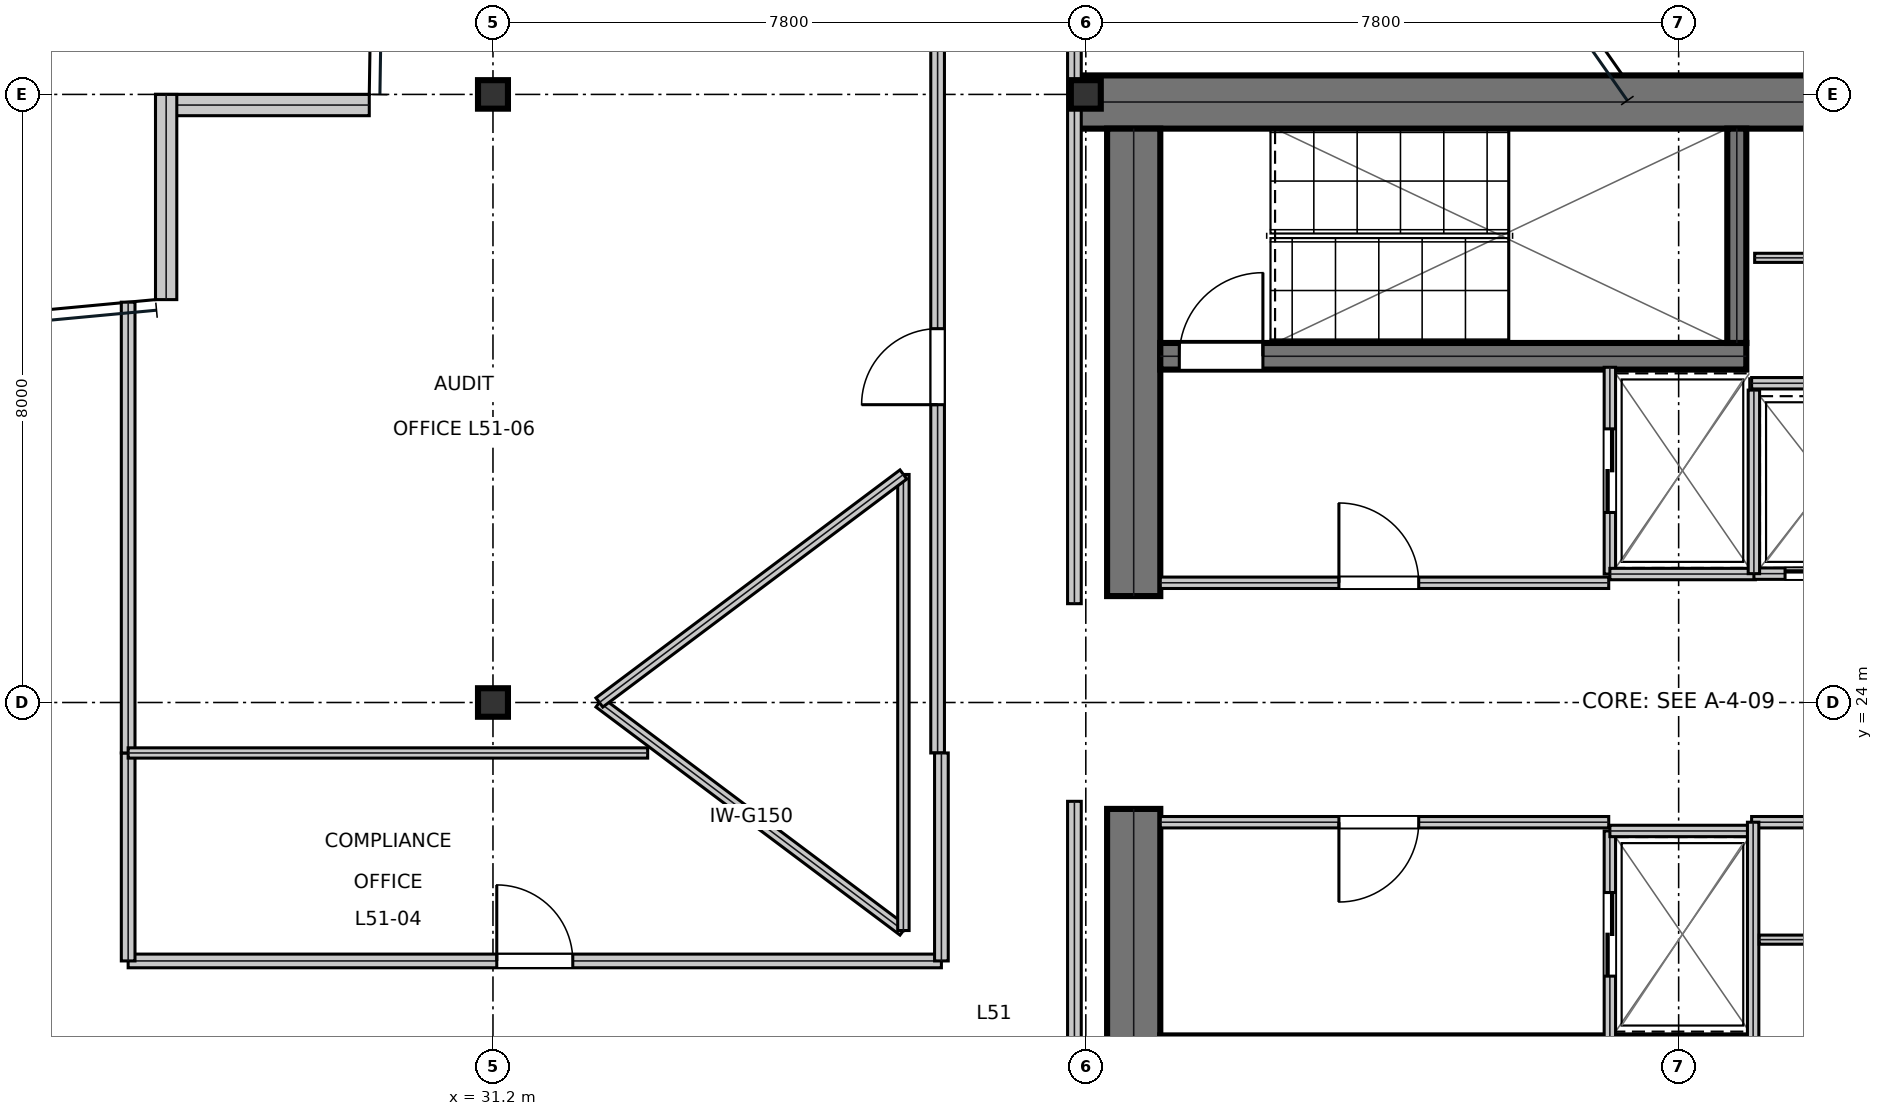
"""IFC4 building model, lengths in metres.
Left out: names, types, materials, properties, quantities, classifications, styles, units other than length and angle.
Written with IfcOpenShell. Run it as: python <this file> out.ifc"""

import sys

from ifc_helpers import new_model, si_unit, direction, frame, frame_2d, origin, origin_2d, place, context, subcontext, project, spatial, rectangle, i_section, extrude, element, fill, save


model = new_model("IFC4")
c1 = context("Model", 3, precision=1e-05, world=origin(), true_north=direction((0.0, 1.0)))
c2 = subcontext(c1, "Body", "Model", "MODEL_VIEW")
j1 = project(units=[si_unit("LENGTHUNIT", "METRE"), si_unit("PLANEANGLEUNIT", "RADIAN")], contexts=[c1])
p1 = place(None, origin())
s1 = spatial("IfcSite", under=j1, at=p1, CompositionType="ELEMENT")
p2 = place(p1, origin())
s2 = spatial("IfcBuilding", under=s1, at=p2, CompositionType="ELEMENT")
p3 = place(p2, frame((0.0, 0.0, 220.2)))
s3 = spatial("IfcBuildingStorey", under=s2, at=p3, CompositionType="ELEMENT", Elevation=220.2)
p4 = place(p3, frame((38.8, 31.9, 0.0), z_axis=(0.0, 0.0, 1.0), x_axis=(1.0, 0.0, 0.0)))
e1 = element("IfcWall", 1, at=p4, inside=s3, PredefinedType="SHEAR", context=c2, shape_type="SweptSolid", body=[
    extrude(rectangle(XDim=16.0, YDim=0.7, at=frame_2d((8.0, 0.0))), origin(), (0.0, 0.0, 1.0), 3.79),
])
for number, where, z_axis, x_axis in (
    (2, (39.63, 16.45, 0.0), (0.0, 0.0, 1.0), (0.0, 1.0, 0.0)),
    (3, (39.63, 25.4, 0.0), (0.0, 0.0, 1.0), (0.0, 1.0, 0.0)),
):
    element("IfcWall", number, at=place(p3, frame(where, z_axis=z_axis, x_axis=x_axis)), inside=s3, PredefinedType="SHEAR", context=c2, shape_type="SweptSolid", body=[
        extrude(rectangle(XDim=6.15, YDim=0.7, at=frame_2d((3.075, 0.0))), origin(), (0.0, 0.0, 1.0), 3.79),
    ])
p5 = place(p3, frame((39.98, 28.555, 0.0), z_axis=(0.0, 0.0, 1.0), x_axis=(1.0, 0.0, 0.0)))
e4 = element("IfcWall", 4, at=p5, inside=s3, PredefinedType="SHEAR", context=c2, shape_type="SweptSolid", body=[
    extrude(rectangle(XDim=7.71, YDim=0.35, at=frame_2d((3.855, 0.0))), origin(), (0.0, 0.0, 1.0), 3.79),
])
p6 = place(p5, frame((0.25, 0.0, 0.0)))
e5 = element("IfcOpeningElement", 5, at=p6, cuts=e4, PredefinedType="OPENING", context=c2, shape_type="SweptSolid", body=[
    extrude(rectangle(XDim=1.1, YDim=2.15, at=frame_2d((0.55, 1.075))), frame((0.0, 0.185, 0.0), z_axis=(0.0, -1.0, 0.0), x_axis=(1.0, 0.0, 0.0)), (0.0, 0.0, 1.0), 0.37),
])
p7 = place(p3, frame((39.98, 19.445, 0.0), z_axis=(0.0, 0.0, 1.0), x_axis=(1.0, 0.0, 0.0)))
e6 = element("IfcWall", 6, at=p7, inside=s3, PredefinedType="SHEAR", context=c2, shape_type="SweptSolid", body=[
    extrude(rectangle(XDim=7.71, YDim=0.35, at=frame_2d((3.855, 0.0))), origin(), (0.0, 0.0, 1.0), 3.79),
])
p8 = place(p7, frame((0.25, 0.0, 0.0)))
e7 = element("IfcOpeningElement", 7, at=p8, cuts=e6, PredefinedType="OPENING", context=c2, shape_type="SweptSolid", body=[
    extrude(rectangle(XDim=1.1, YDim=2.15, at=frame_2d((0.55, 1.075))), frame((0.0, 0.185, 0.0), z_axis=(0.0, -1.0, 0.0), x_axis=(1.0, 0.0, 0.0)), (0.0, 0.0, 1.0), 0.37),
])
p9 = place(p3, frame((47.565, 28.73, 0.0), z_axis=(0.0, 0.0, 1.0), x_axis=(0.0, 1.0, 0.0)))
e8 = element("IfcWall", 8, at=p9, inside=s3, PredefinedType="SHEAR", context=c2, shape_type="SweptSolid", body=[
    extrude(rectangle(XDim=2.82, YDim=0.25, at=frame_2d((1.41, 0.0))), origin(), (0.0, 0.0, 1.0), 3.79),
])
for number, where, z_axis, x_axis in (
    (9, (31.2, 24.0, 0.0), (0.0, 0.0, 1.0), (1.0, 0.0, 0.0)),
    (10, (31.2, 32.0, 0.0), (0.0, 0.0, 1.0), (1.0, 0.0, 0.0)),
    (11, (39.0, 32.0, 0.0), (0.0, 0.0, 1.0), (1.0, 0.0, 0.0)),
):
    element("IfcColumn", number, at=place(p3, frame(where, z_axis=z_axis, x_axis=x_axis)), inside=s3, PredefinedType="COLUMN", context=c2, shape_type="SweptSolid", body=[
        extrude(i_section(OverallWidth=0.394, OverallDepth=0.375, WebThickness=0.017, FlangeThickness=0.028, at=origin_2d()), origin(), (0.0, 0.0, 1.0), 4.044),
    ])
p10 = place(p3, frame((29.573, 31.86, 0.0), z_axis=(0.0, 0.0, 1.0), x_axis=(-1.0, 0.0, 0.0)))
e12 = element("IfcWall", 12, at=p10, inside=s3, PredefinedType="STANDARD", context=c2, shape_type="SweptSolid", body=[
    extrude(rectangle(XDim=2.812, YDim=0.28, at=frame_2d((1.406, 0.0))), origin(), (0.0, 0.0, 1.0), 3.79),
])
p11 = place(p3, frame((26.9, 32.0, 0.0), z_axis=(0.0, 0.0, 1.0), x_axis=(0.0, -1.0, 0.0)))
e13 = element("IfcWall", 13, at=p11, inside=s3, PredefinedType="STANDARD", context=c2, shape_type="SweptSolid", body=[
    extrude(rectangle(XDim=2.7, YDim=0.28, at=frame_2d((1.35, 0.0))), origin(), (0.0, 0.0, 1.0), 3.319),
])
p12 = place(p3, frame((39.98, 25.575, 0.0), z_axis=(0.0, 0.0, 1.0), x_axis=(1.0, 0.0, 0.0)))
e14 = element("IfcWall", 14, at=p12, inside=s3, PredefinedType="PARTITIONING", context=c2, shape_type="SweptSolid", body=[
    extrude(rectangle(XDim=5.9, YDim=0.15, at=frame_2d((2.95, 0.0))), origin(), (0.0, 0.0, 1.0), 3.79),
])
p13 = place(p12, frame((2.35, 0.0, 0.0)))
e15 = element("IfcOpeningElement", 15, at=p13, cuts=e14, PredefinedType="OPENING", context=c2, shape_type="SweptSolid", body=[
    extrude(rectangle(XDim=1.05, YDim=2.15, at=frame_2d((0.525, 1.075))), frame((0.0, 0.085, 0.0), z_axis=(0.0, -1.0, 0.0), x_axis=(1.0, 0.0, 0.0)), (0.0, 0.0, 1.0), 0.17),
])
p14 = place(p3, frame((39.98, 22.425, 0.0), z_axis=(0.0, 0.0, 1.0), x_axis=(1.0, 0.0, 0.0)))
e16 = element("IfcWall", 16, at=p14, inside=s3, PredefinedType="PARTITIONING", context=c2, shape_type="SweptSolid", body=[
    extrude(rectangle(XDim=5.9, YDim=0.15, at=frame_2d((2.95, 0.0))), origin(), (0.0, 0.0, 1.0), 3.79),
])
p15 = place(p14, frame((2.35, 0.0, 0.0)))
e17 = element("IfcOpeningElement", 17, at=p15, cuts=e16, PredefinedType="OPENING", context=c2, shape_type="SweptSolid", body=[
    extrude(rectangle(XDim=1.05, YDim=2.15, at=frame_2d((0.525, 1.075))), frame((0.0, 0.085, 0.0), z_axis=(0.0, -1.0, 0.0), x_axis=(1.0, 0.0, 0.0)), (0.0, 0.0, 1.0), 0.17),
])
p16 = place(p3, frame((45.895, 25.69, 0.0), z_axis=(0.0, 0.0, 1.0), x_axis=(0.0, 1.0, 0.0)))
e18 = element("IfcWall", 18, at=p16, inside=s3, PredefinedType="PARTITIONING", context=c2, shape_type="SweptSolid", body=[
    extrude(rectangle(XDim=2.72, YDim=0.15, at=frame_2d((1.36, 0.0))), origin(), (0.0, 0.0, 1.0), 3.79),
])
p17 = place(p16, frame((0.81, 0.0, 0.0)))
e19 = element("IfcOpeningElement", 19, at=p17, cuts=e18, PredefinedType="OPENING", context=c2, shape_type="SweptSolid", body=[
    extrude(rectangle(XDim=1.1, YDim=2.15, at=frame_2d((0.55, 1.075))), frame((0.0, 0.085, 0.0), z_axis=(0.0, -1.0, 0.0), x_axis=(1.0, 0.0, 0.0)), (0.0, 0.0, 1.0), 0.17),
])
p18 = place(p3, frame((45.895, 25.69, 0.0), z_axis=(0.0, 0.0, 1.0), x_axis=(1.0, 0.0, 0.0)))
e20 = element("IfcWall", 20, at=p18, inside=s3, PredefinedType="PARTITIONING", context=c2, shape_type="SweptSolid", body=[
    extrude(rectangle(XDim=1.915, YDim=0.15, at=frame_2d((0.958, 0.0))), origin(), (0.0, 0.0, 1.0), 3.79),
])
p19 = place(p3, frame((45.895, 19.59, 0.0), z_axis=(0.0, 0.0, 1.0), x_axis=(0.0, 1.0, 0.0)))
e21 = element("IfcWall", 21, at=p19, inside=s3, PredefinedType="PARTITIONING", context=c2, shape_type="SweptSolid", body=[
    extrude(rectangle(XDim=2.72, YDim=0.15, at=frame_2d((1.36, 0.0))), origin(), (0.0, 0.0, 1.0), 3.79),
])
p20 = place(p19, frame((0.81, 0.0, 0.0)))
e22 = element("IfcOpeningElement", 22, at=p20, cuts=e21, PredefinedType="OPENING", context=c2, shape_type="SweptSolid", body=[
    extrude(rectangle(XDim=1.1, YDim=2.15, at=frame_2d((0.55, 1.075))), frame((0.0, 0.085, 0.0), z_axis=(0.0, -1.0, 0.0), x_axis=(1.0, 0.0, 0.0)), (0.0, 0.0, 1.0), 0.17),
])
p21 = place(p3, frame((45.895, 22.31, 0.0), z_axis=(0.0, 0.0, 1.0), x_axis=(1.0, 0.0, 0.0)))
e23 = element("IfcWall", 23, at=p21, inside=s3, PredefinedType="PARTITIONING", context=c2, shape_type="SweptSolid", body=[
    extrude(rectangle(XDim=1.915, YDim=0.15, at=frame_2d((0.958, 0.0))), origin(), (0.0, 0.0, 1.0), 3.79),
])
p22 = place(p3, frame((47.79, 25.695, 0.0), z_axis=(0.0, 0.0, 1.0), x_axis=(1.0, 0.0, 0.0)))
e24 = element("IfcWall", 24, at=p22, inside=s3, PredefinedType="PARTITIONING", context=c2, shape_type="SweptSolid", body=[
    extrude(rectangle(XDim=1.92, YDim=0.15, at=frame_2d((0.96, 0.0))), origin(), (0.0, 0.0, 1.0), 3.79),
])
p23 = place(p22, frame((0.41, 0.0, 0.0)))
e25 = element("IfcOpeningElement", 25, at=p23, cuts=e24, PredefinedType="OPENING", context=c2, shape_type="SweptSolid", body=[
    extrude(rectangle(XDim=1.1, YDim=2.15, at=frame_2d((0.55, 1.075))), frame((0.0, 0.085, 0.0), z_axis=(0.0, -1.0, 0.0), x_axis=(1.0, 0.0, 0.0)), (0.0, 0.0, 1.0), 0.17),
])
p24 = place(p3, frame((47.79, 25.695, 0.0), z_axis=(0.0, 0.0, 1.0), x_axis=(0.0, 1.0, 0.0)))
e26 = element("IfcWall", 26, at=p24, inside=s3, PredefinedType="PARTITIONING", context=c2, shape_type="SweptSolid", body=[
    extrude(rectangle(XDim=2.415, YDim=0.15, at=frame_2d((1.208, 0.0))), origin(), (0.0, 0.0, 1.0), 3.79),
])
p25 = place(p3, frame((47.76, 22.425, 0.0), z_axis=(0.0, 0.0, 1.0), x_axis=(1.0, 0.0, 0.0)))
e27 = element("IfcWall", 27, at=p25, inside=s3, PredefinedType="PARTITIONING", context=c2, shape_type="SweptSolid", body=[
    extrude(rectangle(XDim=1.96, YDim=0.15, at=frame_2d((0.98, 0.0))), origin(), (0.0, 0.0, 1.0), 3.79),
])
p26 = place(p3, frame((47.78, 16.45, 0.0), z_axis=(0.0, 0.0, 1.0), x_axis=(0.0, 1.0, 0.0)))
e28 = element("IfcWall", 28, at=p26, inside=s3, PredefinedType="PARTITIONING", context=c2, shape_type="SweptSolid", body=[
    extrude(rectangle(XDim=5.975, YDim=0.15, at=frame_2d((2.988, 0.0))), origin(), (0.0, 0.0, 1.0), 3.79),
])
p27 = place(p3, frame((47.86, 20.88, 0.0), z_axis=(0.0, 0.0, 1.0), x_axis=(1.0, 0.0, 0.0)))
e29 = element("IfcWall", 29, at=p27, inside=s3, PredefinedType="PARTITIONING", context=c2, shape_type="SweptSolid", body=[
    extrude(rectangle(XDim=1.76, YDim=0.12, at=frame_2d((0.88, 0.0))), origin(), (0.0, 0.0, 1.0), 3.79),
])
p28 = place(p3, frame((47.76, 28.2, 0.0), z_axis=(0.0, 0.0, 1.0), x_axis=(1.0, 0.0, 0.0)))
e30 = element("IfcWall", 30, at=p28, inside=s3, PredefinedType="PARTITIONING", context=c2, shape_type="SweptSolid", body=[
    extrude(rectangle(XDim=2.04, YDim=0.15, at=frame_2d((1.02, 0.0))), origin(), (0.0, 0.0, 1.0), 3.79),
])
p29 = place(p3, frame((47.8, 29.85, 0.0), z_axis=(0.0, 0.0, 1.0), x_axis=(1.0, 0.0, 0.0)))
e31 = element("IfcWall", 31, at=p29, inside=s3, PredefinedType="PARTITIONING", context=c2, shape_type="SweptSolid", body=[
    extrude(rectangle(XDim=5.86, YDim=0.12, at=frame_2d((2.93, 0.0))), origin(), (0.0, 0.0, 1.0), 3.79),
])
p30 = place(p29, frame((2.6, 0.0, 0.0)))
e32 = element("IfcOpeningElement", 32, at=p30, cuts=e31, PredefinedType="OPENING", context=c2, shape_type="SweptSolid", body=[
    extrude(rectangle(XDim=0.85, YDim=2.15, at=frame_2d((0.425, 1.075))), frame((0.0, 0.07, 0.0), z_axis=(0.0, -1.0, 0.0), x_axis=(1.0, 0.0, 0.0)), (0.0, 0.0, 1.0), 0.14),
])
p31 = place(p3, frame((26.4, 20.6, 0.0), z_axis=(0.0, 0.0, 1.0), x_axis=(1.0, 0.0, 0.0)))
e33 = element("IfcWall", 33, at=p31, inside=s3, PredefinedType="SOLIDWALL", context=c2, shape_type="SweptSolid", body=[
    extrude(rectangle(XDim=10.7, YDim=0.18, at=frame_2d((5.35, 0.0))), origin(), (0.0, 0.0, 1.0), 3.241),
])
p32 = place(p31, frame((4.85, 0.0, 0.0)))
e34 = element("IfcOpeningElement", 34, at=p32, cuts=e33, PredefinedType="OPENING", context=c2, shape_type="SweptSolid", body=[
    extrude(rectangle(XDim=1.0, YDim=2.15, at=frame_2d((0.5, 1.075))), frame((0.0, 0.1, 0.0), z_axis=(0.0, -1.0, 0.0), x_axis=(1.0, 0.0, 0.0)), (0.0, 0.0, 1.0), 0.2),
])
p33 = place(p3, frame((37.05, 23.336, 0.0), z_axis=(0.0, 0.0, 1.0), x_axis=(0.0, 1.0, 0.0)))
e35 = element("IfcWall", 35, at=p33, inside=s3, PredefinedType="SOLIDWALL", context=c2, shape_type="SweptSolid", body=[
    extrude(rectangle(XDim=10.164, YDim=0.18, at=frame_2d((5.082, 0.0))), origin(), (0.0, 0.0, 1.0), 3.241),
])
p34 = place(p33, frame((4.582, 0.0, 0.0)))
e36 = element("IfcOpeningElement", 36, at=p34, cuts=e35, PredefinedType="OPENING", context=c2, shape_type="SweptSolid", body=[
    extrude(rectangle(XDim=1.0, YDim=2.15, at=frame_2d((0.5, 1.075))), frame((0.0, 0.1, 0.0), z_axis=(0.0, -1.0, 0.0), x_axis=(1.0, 0.0, 0.0)), (0.0, 0.0, 1.0), 0.2),
])
p35 = place(p3, frame((38.85, 14.707, 0.0), z_axis=(0.0, 0.0, 1.0), x_axis=(0.0, 1.0, 0.0)))
e37 = element("IfcWall", 37, at=p35, inside=s3, PredefinedType="SOLIDWALL", context=c2, shape_type="SweptSolid", body=[
    extrude(rectangle(XDim=7.993, YDim=0.18, at=frame_2d((3.997, 0.0))), origin(), (0.0, 0.0, 1.0), 3.241),
])
p36 = place(p3, frame((26.4, 20.6, 0.0), z_axis=(0.0, 0.0, 1.0), x_axis=(0.0, 1.0, 0.0)))
e38 = element("IfcWall", 38, at=p36, inside=s3, PredefinedType="SOLIDWALL", context=c2, shape_type="SweptSolid", body=[
    extrude(rectangle(XDim=2.736, YDim=0.18, at=frame_2d((1.368, 0.0))), origin(), (0.0, 0.0, 1.0), 3.241),
])
p37 = place(p3, frame((37.1, 20.6, 0.0), z_axis=(0.0, 0.0, 1.0), x_axis=(0.0, 1.0, 0.0)))
e39 = element("IfcWall", 39, at=p37, inside=s3, PredefinedType="SOLIDWALL", context=c2, shape_type="SweptSolid", body=[
    extrude(rectangle(XDim=2.736, YDim=0.18, at=frame_2d((1.368, 0.0))), origin(), (0.0, 0.0, 1.0), 3.79),
])
p38 = place(p3, frame((38.85, 25.3, 0.0), z_axis=(0.0, 0.0, 1.0), x_axis=(0.0, 1.0, 0.0)))
e40 = element("IfcWall", 40, at=p38, inside=s3, PredefinedType="SOLIDWALL", context=c2, shape_type="SweptSolid", body=[
    extrude(rectangle(XDim=8.2, YDim=0.18, at=frame_2d((4.1, 0.0))), origin(), (0.0, 0.0, 1.0), 3.241),
])
p39 = place(p3, frame((26.4, 23.336, 0.0), z_axis=(0.0, 0.0, 1.0), x_axis=(0.0, 1.0, 0.0)))
e41 = element("IfcWall", 41, at=p39, inside=s3, PredefinedType="SOLIDWALL", context=c2, shape_type="SweptSolid", body=[
    extrude(rectangle(XDim=5.931, YDim=0.18, at=frame_2d((2.965, 0.0))), origin(), (0.0, 0.0, 1.0), 3.241),
])
p40 = place(p3, frame((26.4, 23.336, 0.0), z_axis=(0.0, 0.0, 1.0), x_axis=(1.0, 0.0, 0.0)))
e42 = element("IfcWall", 42, at=p40, inside=s3, PredefinedType="PARTITIONING", context=c2, shape_type="SweptSolid", body=[
    extrude(rectangle(XDim=6.835, YDim=0.135, at=frame_2d((3.418, 0.0))), origin(), (0.0, 0.0, 1.0), 3.241),
])
p41 = place(p3, frame((32.6, 24.0, 0.0), z_axis=(0.0, 0.0, 1.0), x_axis=(0.8, -0.6, 0.0)))
e43 = element("IfcWall", 43, at=p41, inside=s3, PredefinedType="MOVABLE", context=c2, shape_type="SweptSolid", body=[
    extrude(rectangle(XDim=5.0, YDim=0.15, at=frame_2d((2.5, 0.0))), origin(), (0.0, 0.0, 1.0), 3.79),
])
p42 = place(p3, frame((36.6, 21.0, 0.0), z_axis=(0.0, 0.0, 1.0), x_axis=(0.0, 1.0, 0.0)))
e44 = element("IfcWall", 44, at=p42, inside=s3, PredefinedType="MOVABLE", context=c2, shape_type="SweptSolid", body=[
    extrude(rectangle(XDim=6.0, YDim=0.15, at=frame_2d((3.0, 0.0))), origin(), (0.0, 0.0, 1.0), 3.79),
])
p43 = place(p3, frame((36.6, 27.0, 0.0), z_axis=(0.0, 0.0, 1.0), x_axis=(-0.8, -0.6, 0.0)))
e45 = element("IfcWall", 45, at=p43, inside=s3, PredefinedType="MOVABLE", context=c2, shape_type="SweptSolid", body=[
    extrude(rectangle(XDim=5.0, YDim=0.15, at=frame_2d((2.5, 0.0))), origin(), (0.0, 0.0, 1.0), 3.79),
])
p44 = place(p13, origin())
e46 = element("IfcDoor", 46, at=p44, inside=s3, OperationType="SINGLE_SWING_LEFT", PredefinedType="DOOR", context=c2, shape_type="SweptSolid", body=[
    extrude(rectangle(XDim=1.05, YDim=2.15, at=frame_2d((0.525, 1.075))), frame((0.0, 0.025, 0.0), z_axis=(0.0, -1.0, 0.0), x_axis=(1.0, 0.0, 0.0)), (0.0, 0.0, 1.0), 0.05),
])
fill(e15, e46)
p45 = place(p15, frame((1.05, 0.0, 0.0), z_axis=(0.0, 0.0, 1.0), x_axis=(-1.0, 0.0, 0.0)))
e47 = element("IfcDoor", 47, at=p45, inside=s3, OperationType="SINGLE_SWING_RIGHT", PredefinedType="DOOR", context=c2, shape_type="SweptSolid", body=[
    extrude(rectangle(XDim=1.05, YDim=2.15, at=frame_2d((0.525, 1.075))), frame((0.0, 0.025, 0.0), z_axis=(0.0, -1.0, 0.0), x_axis=(1.0, 0.0, 0.0)), (0.0, 0.0, 1.0), 0.05),
])
fill(e17, e47)
p46 = place(p17, frame((1.1, 0.0, 0.0), z_axis=(0.0, 0.0, 1.0), x_axis=(-1.0, 0.0, 0.0)))
e48 = element("IfcDoor", 48, at=p46, inside=s3, OperationType="DOUBLE_DOOR_SLIDING", PredefinedType="DOOR", context=c2, shape_type="SweptSolid", body=[
    extrude(rectangle(XDim=1.1, YDim=2.15, at=frame_2d((0.55, 1.075))), frame((0.0, 0.025, 0.0), z_axis=(0.0, -1.0, 0.0), x_axis=(1.0, 0.0, 0.0)), (0.0, 0.0, 1.0), 0.05),
])
fill(e19, e48)
p47 = place(p20, frame((1.1, 0.0, 0.0), z_axis=(0.0, 0.0, 1.0), x_axis=(-1.0, 0.0, 0.0)))
e49 = element("IfcDoor", 49, at=p47, inside=s3, OperationType="DOUBLE_DOOR_SLIDING", PredefinedType="DOOR", context=c2, shape_type="SweptSolid", body=[
    extrude(rectangle(XDim=1.1, YDim=2.15, at=frame_2d((0.55, 1.075))), frame((0.0, 0.025, 0.0), z_axis=(0.0, -1.0, 0.0), x_axis=(1.0, 0.0, 0.0)), (0.0, 0.0, 1.0), 0.05),
])
fill(e22, e49)
p48 = place(p23, frame((1.1, 0.0, 0.0), z_axis=(0.0, 0.0, 1.0), x_axis=(-1.0, 0.0, 0.0)))
e50 = element("IfcDoor", 50, at=p48, inside=s3, OperationType="DOUBLE_DOOR_SLIDING", PredefinedType="DOOR", context=c2, shape_type="SweptSolid", body=[
    extrude(rectangle(XDim=1.1, YDim=2.15, at=frame_2d((0.55, 1.075))), frame((0.0, 0.025, 0.0), z_axis=(0.0, -1.0, 0.0), x_axis=(1.0, 0.0, 0.0)), (0.0, 0.0, 1.0), 0.05),
])
fill(e25, e50)
p49 = place(p32, origin())
e51 = element("IfcDoor", 51, at=p49, inside=s3, OperationType="SINGLE_SWING_LEFT", PredefinedType="DOOR", context=c2, shape_type="SweptSolid", body=[
    extrude(rectangle(XDim=1.0, YDim=2.15, at=frame_2d((0.5, 1.075))), frame((0.0, 0.025, 0.0), z_axis=(0.0, -1.0, 0.0), x_axis=(1.0, 0.0, 0.0)), (0.0, 0.0, 1.0), 0.05),
])
fill(e34, e51)
p50 = place(p34, origin())
e52 = element("IfcDoor", 52, at=p50, inside=s3, OperationType="SINGLE_SWING_LEFT", PredefinedType="DOOR", context=c2, shape_type="SweptSolid", body=[
    extrude(rectangle(XDim=1.0, YDim=2.15, at=frame_2d((0.5, 1.075))), frame((0.0, 0.025, 0.0), z_axis=(0.0, -1.0, 0.0), x_axis=(1.0, 0.0, 0.0)), (0.0, 0.0, 1.0), 0.05),
])
fill(e36, e52)
p51 = place(p6, origin())
e53 = element("IfcDoor", 53, at=p51, inside=s3, OperationType="SINGLE_SWING_RIGHT", PredefinedType="DOOR", context=c2, shape_type="SweptSolid", body=[
    extrude(rectangle(XDim=1.1, YDim=2.15, at=frame_2d((0.55, 1.075))), frame((0.0, 0.025, 0.0), z_axis=(0.0, -1.0, 0.0), x_axis=(1.0, 0.0, 0.0)), (0.0, 0.0, 1.0), 0.05),
])
fill(e5, e53)
save(model, sys.argv[1])
